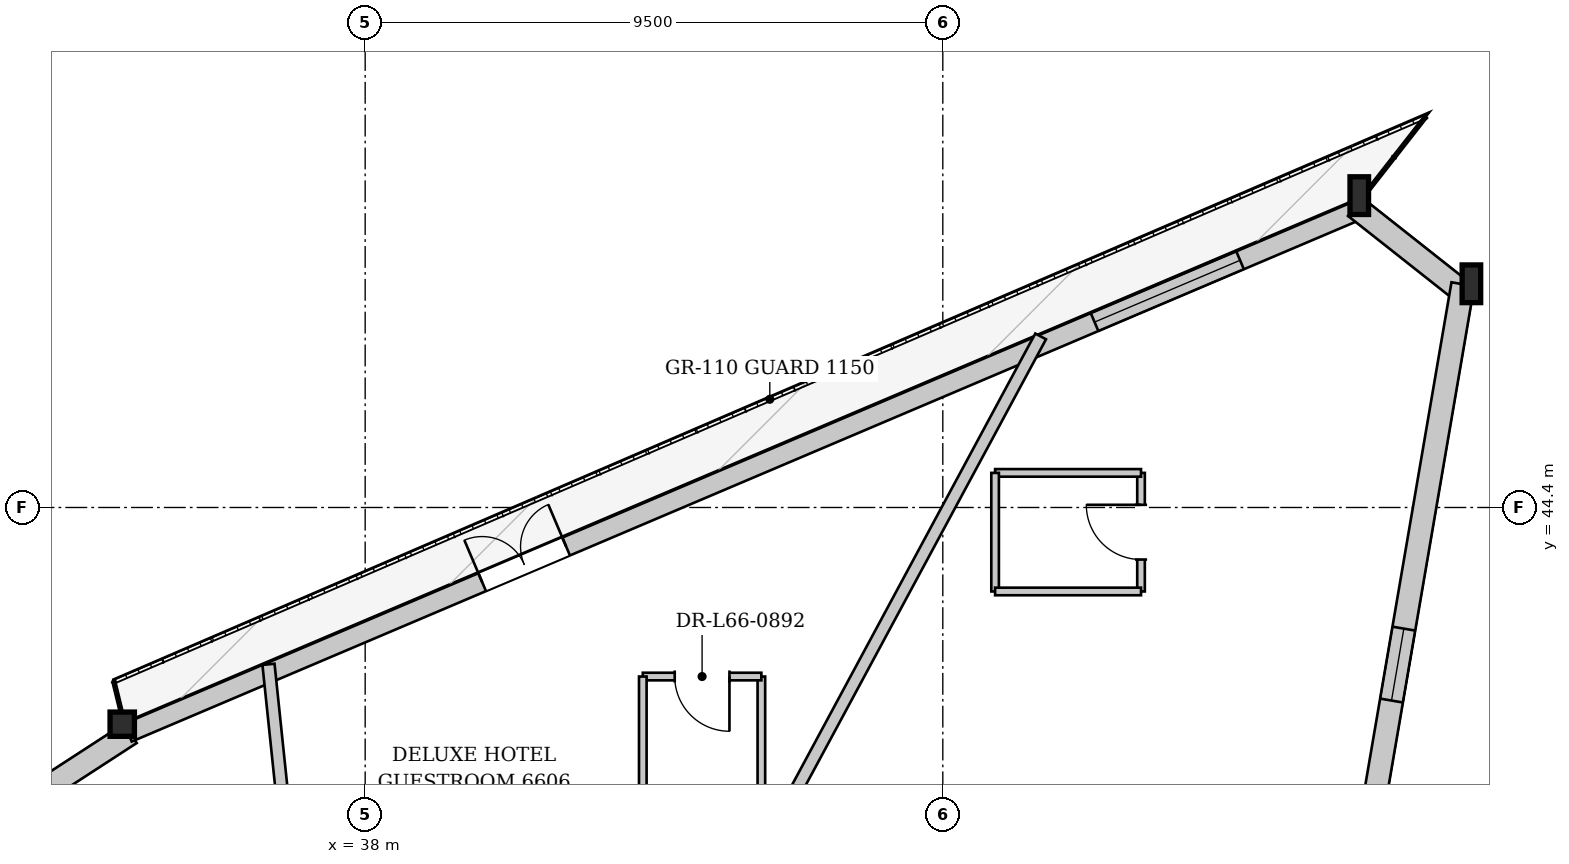
"""IFC4 building model, lengths in metres.
Left out: names, types, materials, properties, quantities, classifications, styles, units other than length and angle.
Written with IfcOpenShell. Run it as: python <this file> out.ifc"""

import sys

from ifc_helpers import new_model, si_unit, direction, frame, frame_2d, origin, origin_2d, place, context, subcontext, project, spatial, rectangle, i_section, extrude, source, transform, mapped, element, fill, save


model = new_model("IFC4")
c1 = context("Model", 3, precision=1e-05, world=origin(), true_north=direction((0.0, 1.0)))
c2 = subcontext(c1, "Body", "Model", "MODEL_VIEW")
j1 = project(units=[si_unit("LENGTHUNIT", "METRE"), si_unit("PLANEANGLEUNIT", "RADIAN")], contexts=[c1])
p1 = place(None, origin())
s1 = spatial("IfcSite", under=j1, at=p1, CompositionType="ELEMENT")
p2 = place(p1, origin())
s2 = spatial("IfcBuilding", under=s1, at=p2, CompositionType="ELEMENT")
p3 = place(p2, frame((0.0, 0.0, 248.9)))
s3 = spatial("IfcBuildingStorey", under=s2, at=p3, CompositionType="ELEMENT", Elevation=248.9)
m1 = source(origin(), c2, "Body", "SweptSolid", [
    extrude(i_section(OverallWidth=0.305, OverallDepth=0.62, WebThickness=0.021, FlangeThickness=0.04, at=origin_2d()), origin(), (0.0, 0.0, 1.0), 3.437),
])
for number, where, z_axis, x_axis in (
    (1, (56.24, 48.039, 0.0), (-0.027, 0.023, 0.999), (-0.646, -0.763, 0.0)),
    (2, (54.399, 49.493, 0.0), (-0.029, 0.021, 0.999), (-0.58, -0.815, 0.0)),
):
    element("IfcColumn", number, at=place(p3, frame(where, z_axis=z_axis, x_axis=x_axis)), inside=s3, PredefinedType="COLUMN", context=c2, shape_type="MappedRepresentation", body=[
        mapped(m1, transform((0.0, 0.0, 0.0), x_axis=(1.0, 0.0, 0.0), y_axis=(0.0, 1.0, 0.0), z_axis=(0.0, 0.0, 1.0), scale=1.0)),
    ])
m2 = source(origin(), c2, "Body", "SweptSolid", [
    extrude(i_section(OverallWidth=0.401, OverallDepth=0.399, WebThickness=0.022, FlangeThickness=0.034, at=origin_2d()), origin(), (0.0, 0.0, 1.0), 3.436),
])
p4 = place(p3, frame((34.036, 40.845, 0.0), z_axis=(-0.018120454418, -0.0051163636, 0.999822720264), x_axis=(0.271729070223, -0.962373790372, 0.0)))
e3 = element("IfcColumn", 3, at=p4, inside=s3, PredefinedType="COLUMN", context=c2, shape_type="MappedRepresentation", body=[
    mapped(m2, transform((0.0, 0.0, 0.0), x_axis=(1.0, 0.0, 0.0), y_axis=(0.0, 1.0, 0.0), z_axis=(0.0, 0.0, 1.0), scale=1.0)),
])
p5 = place(p3, frame((15.584, 28.637, 0.0), z_axis=(0.0, 0.0, 1.0), x_axis=(0.838692120157, 0.544605846083, 0.0)))
e4 = element("IfcWall", 4, at=p5, inside=s3, PredefinedType="SOLIDWALL", context=c2, shape_type="SweptSolid", body=[
    extrude(rectangle(XDim=22.124, YDim=0.38, at=frame_2d((11.062, 0.0))), origin(), (0.0, 0.0, 1.0), 2.872),
])
p6 = place(p5, frame((5.595, 0.0, 0.65)))
e5 = element("IfcOpeningElement", 5, at=p6, cuts=e4, PredefinedType="OPENING", context=c2, shape_type="SweptSolid", body=[
    extrude(rectangle(XDim=1.2, YDim=1.5, at=frame_2d((0.6, 0.75))), frame((0.0, 0.2, 0.0), z_axis=(0.0, -1.0, 0.0), x_axis=(1.0, 0.0, 0.0)), (0.0, 0.0, 1.0), 0.4),
])
p7 = place(p5, frame((16.929, 0.0, 0.65)))
e6 = element("IfcOpeningElement", 6, at=p7, cuts=e4, PredefinedType="OPENING", context=c2, shape_type="SweptSolid", body=[
    extrude(rectangle(XDim=1.2, YDim=1.5, at=frame_2d((0.6, 0.75))), frame((0.0, 0.2, 0.0), z_axis=(0.0, -1.0, 0.0), x_axis=(1.0, 0.0, 0.0)), (0.0, 0.0, 1.0), 0.4),
])
p8 = place(p3, frame((34.098, 40.698, 0.0), z_axis=(0.0, 0.0, 1.0), x_axis=(0.920439131347, 0.390885923877, 0.0)))
e7 = element("IfcWall", 7, at=p8, inside=s3, PredefinedType="SOLIDWALL", context=c2, shape_type="SweptSolid", body=[
    extrude(rectangle(XDim=22.124, YDim=0.32, at=frame_2d((11.062, 0.0))), origin(), (0.0, 0.0, 1.0), 2.872),
])
p9 = place(p8, frame((6.33, 0.0, 0.0)))
e8 = element("IfcOpeningElement", 8, at=p9, cuts=e7, PredefinedType="OPENING", context=c2, shape_type="SweptSolid", body=[
    extrude(rectangle(XDim=1.5, YDim=2.3, at=frame_2d((0.75, 1.15))), frame((0.0, 0.17, 0.0), z_axis=(0.0, -1.0, 0.0), x_axis=(1.0, 0.0, 0.0)), (0.0, 0.0, 1.0), 0.34),
])
p10 = place(p8, frame((17.272, 0.0, 0.402)))
e9 = element("IfcOpeningElement", 9, at=p10, cuts=e7, PredefinedType="OPENING", context=c2, shape_type="SweptSolid", body=[
    extrude(rectangle(XDim=2.6, YDim=2.35, at=frame_2d((1.3, 1.175))), frame((0.0, 0.17, 0.0), z_axis=(0.0, -1.0, 0.0), x_axis=(1.0, 0.0, 0.0)), (0.0, 0.0, 1.0), 0.34),
])
p11 = place(p3, frame((54.281, 49.344, 0.0), z_axis=(0.0, 0.0, 1.0), x_axis=(0.784802840653, -0.619745513339, 0.0)))
e10 = element("IfcWall", 10, at=p11, inside=s3, PredefinedType="SOLIDWALL", context=c2, shape_type="SweptSolid", body=[
    extrude(rectangle(XDim=2.346, YDim=0.38, at=frame_2d((1.173, 0.0))), origin(), (0.0, 0.0, 1.0), 2.872),
])
p12 = place(p3, frame((56.053, 48.071, 0.0), z_axis=(0.0, 0.0, 1.0), x_axis=(-0.168923450159, -0.985629173668, 0.0)))
e11 = element("IfcWall", 11, at=p12, inside=s3, PredefinedType="SOLIDWALL", context=c2, shape_type="SweptSolid", body=[
    extrude(rectangle(XDim=22.663, YDim=0.38, at=frame_2d((11.332, 0.0))), origin(), (0.0, 0.0, 1.0), 2.872),
])
p13 = place(p12, frame((5.746, 0.0, 0.65)))
e12 = element("IfcOpeningElement", 12, at=p13, cuts=e11, PredefinedType="OPENING", context=c2, shape_type="SweptSolid", body=[
    extrude(rectangle(XDim=1.2, YDim=1.5, at=frame_2d((0.6, 0.75))), frame((0.0, 0.2, 0.0), z_axis=(0.0, -1.0, 0.0), x_axis=(1.0, 0.0, 0.0)), (0.0, 0.0, 1.0), 0.4),
])
p14 = place(p12, frame((15.718, 0.0, 0.65)))
e13 = element("IfcOpeningElement", 13, at=p14, cuts=e11, PredefinedType="OPENING", context=c2, shape_type="SweptSolid", body=[
    extrude(rectangle(XDim=1.2, YDim=1.5, at=frame_2d((0.6, 0.75))), frame((0.0, 0.2, 0.0), z_axis=(0.0, -1.0, 0.0), x_axis=(1.0, 0.0, 0.0)), (0.0, 0.0, 1.0), 0.4),
])
p15 = place(p3, frame((42.069, 34.15, 0.0), z_axis=(0.0, 0.0, 1.0), x_axis=(0.474411767959, 0.880303058283, 0.0)))
e14 = element("IfcWall", 14, at=p15, inside=s3, PredefinedType="PARTITIONING", context=c2, shape_type="SweptSolid", body=[
    extrude(rectangle(XDim=14.84, YDim=0.2, at=frame_2d((7.42, 0.0))), origin(), (0.0, 0.0, 1.0), 3.38),
])
p16 = place(p3, frame((37.018, 36.0, 0.0), z_axis=(0.0, 0.0, 1.0), x_axis=(-0.103876913676, 0.994590160219, 0.0)))
e15 = element("IfcWall", 15, at=p16, inside=s3, PredefinedType="PARTITIONING", context=c2, shape_type="SweptSolid", body=[
    extrude(rectangle(XDim=5.852, YDim=0.2, at=frame_2d((2.926, 0.0))), origin(), (0.0, 0.0, 1.0), 3.38),
])
p17 = place(p3, frame((50.76, 43.019, 0.0), z_axis=(0.0, 0.0, 1.0), x_axis=(0.0, 1.0, 0.0)))
e16 = element("IfcWall", 16, at=p17, inside=s3, PredefinedType="PARTITIONING", context=c2, shape_type="SweptSolid", body=[
    extrude(rectangle(XDim=1.95, YDim=0.125, at=frame_2d((0.975, 0.0))), origin(), (0.0, 0.0, 1.0), 3.38),
])
p18 = place(p17, frame((0.525, 0.0, 0.0)))
e17 = element("IfcOpeningElement", 17, at=p18, cuts=e16, PredefinedType="OPENING", context=c2, shape_type="SweptSolid", body=[
    extrude(rectangle(XDim=0.9, YDim=2.1, at=frame_2d((0.45, 1.05))), frame((0.0, 0.073, 0.0), z_axis=(0.0, -1.0, 0.0), x_axis=(1.0, 0.0, 0.0)), (0.0, 0.0, 1.0), 0.145),
])
p19 = place(p3, frame((50.76, 44.969, 0.0), z_axis=(0.0, 0.0, 1.0), x_axis=(-1.0, 0.0, 0.0)))
e18 = element("IfcWall", 18, at=p19, inside=s3, PredefinedType="PARTITIONING", context=c2, shape_type="SweptSolid", body=[
    extrude(rectangle(XDim=2.4, YDim=0.125, at=frame_2d((1.2, 0.0))), origin(), (0.0, 0.0, 1.0), 3.38),
])
p20 = place(p3, frame((48.36, 44.969, 0.0), z_axis=(0.0, 0.0, 1.0), x_axis=(0.0, -1.0, 0.0)))
e19 = element("IfcWall", 19, at=p20, inside=s3, PredefinedType="PARTITIONING", context=c2, shape_type="SweptSolid", body=[
    extrude(rectangle(XDim=1.95, YDim=0.125, at=frame_2d((0.975, 0.0))), origin(), (0.0, 0.0, 1.0), 3.38),
])
p21 = place(p3, frame((48.36, 43.019, 0.0), z_axis=(0.0, 0.0, 1.0), x_axis=(1.0, 0.0, 0.0)))
e20 = element("IfcWall", 20, at=p21, inside=s3, PredefinedType="PARTITIONING", context=c2, shape_type="SweptSolid", body=[
    extrude(rectangle(XDim=2.4, YDim=0.125, at=frame_2d((1.2, 0.0))), origin(), (0.0, 0.0, 1.0), 3.125),
])
p22 = place(p3, frame((44.516, 39.22, 0.0), z_axis=(0.0, 0.0, 1.0), x_axis=(0.0, 1.0, 0.0)))
e21 = element("IfcWall", 21, at=p22, inside=s3, PredefinedType="PARTITIONING", context=c2, shape_type="SweptSolid", body=[
    extrude(rectangle(XDim=2.4, YDim=0.125, at=frame_2d((1.2, 0.0))), origin(), (0.0, 0.0, 1.0), 3.38),
])
p23 = place(p3, frame((44.516, 41.62, 0.0), z_axis=(0.0, 0.0, 1.0), x_axis=(-1.0, 0.0, 0.0)))
e22 = element("IfcWall", 22, at=p23, inside=s3, PredefinedType="PARTITIONING", context=c2, shape_type="SweptSolid", body=[
    extrude(rectangle(XDim=1.95, YDim=0.125, at=frame_2d((0.975, 0.0))), origin(), (0.0, 0.0, 1.0), 3.125),
])
p24 = place(p23, frame((0.525, 0.0, 0.0)))
e23 = element("IfcOpeningElement", 23, at=p24, cuts=e22, PredefinedType="OPENING", context=c2, shape_type="SweptSolid", body=[
    extrude(rectangle(XDim=0.9, YDim=2.1, at=frame_2d((0.45, 1.05))), frame((0.0, 0.073, 0.0), z_axis=(0.0, -1.0, 0.0), x_axis=(1.0, 0.0, 0.0)), (0.0, 0.0, 1.0), 0.145),
])
p25 = place(p3, frame((42.566, 41.62, 0.0), z_axis=(0.0, 0.0, 1.0), x_axis=(0.0, -1.0, 0.0)))
e24 = element("IfcWall", 24, at=p25, inside=s3, PredefinedType="PARTITIONING", context=c2, shape_type="SweptSolid", body=[
    extrude(rectangle(XDim=2.4, YDim=0.125, at=frame_2d((1.2, 0.0))), origin(), (0.0, 0.0, 1.0), 3.38),
])
m3 = source(origin(), c2, "Body", "SweptSolid", [
    extrude(rectangle(XDim=1.5, YDim=2.3, at=frame_2d((0.75, 1.15))), frame((0.0, 0.025, 0.0), z_axis=(0.0, -1.0, 0.0), x_axis=(1.0, 0.0, 0.0)), (0.0, 0.0, 1.0), 0.05),
])
p26 = place(p9, origin())
e25 = element("IfcDoor", 25, at=p26, inside=s3, OperationType="DOUBLE_DOOR_SINGLE_SWING", PredefinedType="DOOR", context=c2, shape_type="MappedRepresentation", body=[
    mapped(m3, transform((0.0, 0.0, 0.0), x_axis=(1.0, 0.0, 0.0), y_axis=(0.0, 1.0, 0.0), z_axis=(0.0, 0.0, 1.0), scale=1.0)),
])
fill(e8, e25)
m4 = source(origin(), c2, "Body", "SweptSolid", [
    extrude(rectangle(XDim=2.6, YDim=2.35, at=frame_2d((1.3, 1.175))), frame((0.0, 0.03, 0.0), z_axis=(0.0, -1.0, 0.0), x_axis=(1.0, 0.0, 0.0)), (0.0, 0.0, 1.0), 0.06),
])
p27 = place(p10, origin())
e26 = element("IfcWindow", 26, at=p27, inside=s3, PartitioningType="SINGLE_PANEL", PredefinedType="WINDOW", context=c2, shape_type="MappedRepresentation", body=[
    mapped(m4, transform((0.0, 0.0, 0.0), x_axis=(1.0, 0.0, 0.0), y_axis=(0.0, 1.0, 0.0), z_axis=(0.0, 0.0, 1.0), scale=1.0)),
])
fill(e9, e26)
m5 = source(origin(), c2, "Body", "SweptSolid", [
    extrude(rectangle(XDim=1.2, YDim=1.5, at=frame_2d((0.6, 0.75))), frame((0.0, 0.03, 0.0), z_axis=(0.0, -1.0, 0.0), x_axis=(1.0, 0.0, 0.0)), (0.0, 0.0, 1.0), 0.06),
])
p28 = place(p13, origin())
e27 = element("IfcWindow", 27, at=p28, inside=s3, PartitioningType="SINGLE_PANEL", PredefinedType="WINDOW", context=c2, shape_type="MappedRepresentation", body=[
    mapped(m5, transform((0.0, 0.0, 0.0), x_axis=(1.0, 0.0, 0.0), y_axis=(0.0, 1.0, 0.0), z_axis=(0.0, 0.0, 1.0), scale=1.0)),
])
fill(e12, e27)
m6 = source(origin(), c2, "Body", "SweptSolid", [
    extrude(rectangle(XDim=0.9, YDim=2.1, at=frame_2d((0.45, 1.05))), frame((0.0, 0.025, 0.0), z_axis=(0.0, -1.0, 0.0), x_axis=(1.0, 0.0, 0.0)), (0.0, 0.0, 1.0), 0.05),
])
p29 = place(p18, origin())
e28 = element("IfcDoor", 28, at=p29, inside=s3, OperationType="SINGLE_SWING_RIGHT", PredefinedType="DOOR", context=c2, shape_type="MappedRepresentation", body=[
    mapped(m6, transform((0.0, 0.0, 0.0), x_axis=(1.0, 0.0, 0.0), y_axis=(0.0, 1.0, 0.0), z_axis=(0.0, 0.0, 1.0), scale=1.0)),
])
fill(e17, e28)
p30 = place(p24, origin())
e29 = element("IfcDoor", 29, at=p30, inside=s3, OperationType="SINGLE_SWING_LEFT", PredefinedType="DOOR", context=c2, shape_type="MappedRepresentation", body=[
    mapped(m6, transform((0.0, 0.0, 0.0), x_axis=(1.0, 0.0, 0.0), y_axis=(0.0, 1.0, 0.0), z_axis=(0.0, 0.0, 1.0), scale=1.0)),
])
fill(e23, e29)
save(model, sys.argv[1])
